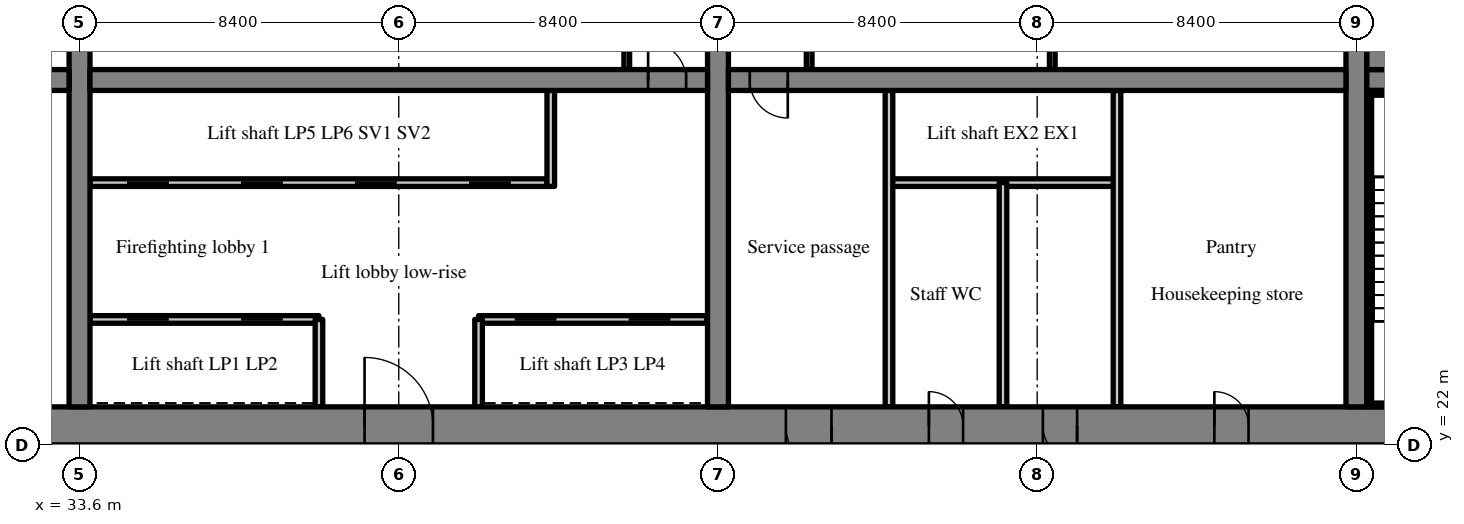
"""IFC4 building model, lengths in metres.
Left out: names, types, materials, properties, quantities, classifications, styles, units other than length and angle.
Written with IfcOpenShell. Run it as: python <this file> out.ifc"""

import sys

from ifc_helpers import new_model, si_unit, direction, frame, frame_2d, origin, place, context, subcontext, project, spatial, rectangle, extrude, source, transform, mapped, element, fill, save


model = new_model("IFC4")
c1 = context("Model", 3, precision=1e-05, world=origin(), true_north=direction((0.0, 1.0)))
c2 = subcontext(c1, "Body", "Model", "MODEL_VIEW")
j1 = project(units=[si_unit("LENGTHUNIT", "METRE"), si_unit("PLANEANGLEUNIT", "RADIAN")], contexts=[c1])
p1 = place(None, origin())
s1 = spatial("IfcSite", under=j1, at=p1, CompositionType="ELEMENT")
p2 = place(p1, origin())
s2 = spatial("IfcBuilding", under=s1, at=p2, CompositionType="ELEMENT")
p3 = place(p2, frame((0.0, 0.0, 54.4)))
s3 = spatial("IfcBuildingStorey", under=s2, at=p3, CompositionType="ELEMENT", Elevation=54.4)
m1 = source(origin(), c2, "Body", "SweptSolid", [
    extrude(rectangle(XDim=50.4, YDim=1.0, at=frame_2d((25.2, 0.0))), origin(), (0.0, 0.0, 1.0), 3.52),
])
p4 = place(p3, frame((25.2, 22.5, 0.0), z_axis=(0.0, 0.0, 1.0), x_axis=(1.0, 0.0, 0.0)))
e1 = element("IfcWall", 1, at=p4, inside=s3, PredefinedType="SHEAR", context=c2, shape_type="MappedRepresentation", body=[
    mapped(m1, transform((0.0, 0.0, 0.0), scale=1.0)),
])
m2 = source(origin(), c2, "Body", "SweptSolid", [
    extrude(rectangle(XDim=1.8, YDim=2.1, at=frame_2d((0.9, 1.05))), frame((0.0, 0.51, 0.0), z_axis=(0.0, -1.0, 0.0), x_axis=(1.0, 0.0, 0.0)), (0.0, 0.0, 1.0), 1.02),
])
p5 = place(p4, frame((15.9, 0.0, 0.0)))
e2 = element("IfcOpeningElement", 2, at=p5, cuts=e1, PredefinedType="OPENING", context=c2, shape_type="MappedRepresentation", body=[
    mapped(m2, transform((0.0, 0.0, 0.0), scale=1.0)),
])
m3 = source(origin(), c2, "Body", "SweptSolid", [
    extrude(rectangle(XDim=1.2, YDim=2.1, at=frame_2d((0.6, 1.05))), frame((0.0, 0.51, 0.0), z_axis=(0.0, -1.0, 0.0), x_axis=(1.0, 0.0, 0.0)), (0.0, 0.0, 1.0), 1.02),
])
p6 = place(p4, frame((26.987, 0.0, 0.0)))
e3 = element("IfcOpeningElement", 3, at=p6, cuts=e1, PredefinedType="OPENING", context=c2, shape_type="MappedRepresentation", body=[
    mapped(m3, transform((0.0, 0.0, 0.0), scale=1.0)),
])
m4 = source(origin(), c2, "Body", "SweptSolid", [
    extrude(rectangle(XDim=0.9, YDim=2.1, at=frame_2d((0.45, 1.05))), frame((0.0, 0.51, 0.0), z_axis=(0.0, -1.0, 0.0), x_axis=(1.0, 0.0, 0.0)), (0.0, 0.0, 1.0), 1.02),
])
p7 = place(p4, frame((33.75, 0.0, 0.0)))
e4 = element("IfcOpeningElement", 4, at=p7, cuts=e1, PredefinedType="OPENING", context=c2, shape_type="MappedRepresentation", body=[
    mapped(m4, transform((0.0, 0.0, 0.0), scale=1.0)),
])
p8 = place(p4, frame((30.75, 0.0, 0.0)))
e5 = element("IfcOpeningElement", 5, at=p8, cuts=e1, PredefinedType="OPENING", context=c2, shape_type="MappedRepresentation", body=[
    mapped(m4, transform((0.0, 0.0, 0.0), scale=1.0)),
])
p9 = place(p4, frame((38.262, 0.0, 0.0)))
e6 = element("IfcOpeningElement", 6, at=p9, cuts=e1, PredefinedType="OPENING", context=c2, shape_type="MappedRepresentation", body=[
    mapped(m4, transform((0.0, 0.0, 0.0), scale=1.0)),
])
p10 = place(p4, frame((6.438, 0.0, 0.0)))
e7 = element("IfcOpeningElement", 7, at=p10, cuts=e1, PredefinedType="OPENING", context=c2, shape_type="MappedRepresentation", body=[
    mapped(m3, transform((0.0, 0.0, 0.0), scale=1.0)),
])
p11 = place(p4, frame((47.725, 0.0, 0.0)))
e8 = element("IfcOpeningElement", 8, at=p11, cuts=e1, PredefinedType="OPENING", context=c2, shape_type="MappedRepresentation", body=[
    mapped(m3, transform((0.0, 0.0, 0.0), scale=1.0)),
])
m5 = source(origin(), c2, "Body", "SweptSolid", [
    extrude(rectangle(XDim=18.0, YDim=0.55, at=frame_2d((9.0, 0.0))), origin(), (0.0, 0.0, 1.0), 3.52),
])
p12 = place(p3, frame((33.6, 23.0, 0.0), z_axis=(0.0, 0.0, 1.0), x_axis=(0.0, 1.0, 0.0)))
e9 = element("IfcWall", 9, at=p12, inside=s3, PredefinedType="SHEAR", context=c2, shape_type="MappedRepresentation", body=[
    mapped(m5, transform((0.0, 0.0, 0.0), scale=1.0)),
])
m6 = source(origin(), c2, "Body", "SweptSolid", [
    extrude(rectangle(XDim=1.1, YDim=2.1, at=frame_2d((0.55, 1.05))), frame((0.0, 0.285, 0.0), z_axis=(0.0, -1.0, 0.0), x_axis=(1.0, 0.0, 0.0)), (0.0, 0.0, 1.0), 0.57),
])
p13 = place(p12, frame((12.45, 0.0, 0.0)))
e10 = element("IfcOpeningElement", 10, at=p13, cuts=e9, PredefinedType="OPENING", context=c2, shape_type="MappedRepresentation", body=[
    mapped(m6, transform((0.0, 0.0, 0.0), scale=1.0)),
])
p14 = place(p3, frame((50.4, 23.0, 0.0), z_axis=(0.0, 0.0, 1.0), x_axis=(0.0, 1.0, 0.0)))
e11 = element("IfcWall", 11, at=p14, inside=s3, PredefinedType="SHEAR", context=c2, shape_type="MappedRepresentation", body=[
    mapped(m5, transform((0.0, 0.0, 0.0), scale=1.0)),
])
p15 = place(p14, frame((12.45, 0.0, 0.0)))
e12 = element("IfcOpeningElement", 12, at=p15, cuts=e11, PredefinedType="OPENING", context=c2, shape_type="MappedRepresentation", body=[
    mapped(m6, transform((0.0, 0.0, 0.0), scale=1.0)),
])
p16 = place(p3, frame((67.2, 23.0, 0.0), z_axis=(0.0, 0.0, 1.0), x_axis=(0.0, 1.0, 0.0)))
e13 = element("IfcWall", 13, at=p16, inside=s3, PredefinedType="SHEAR", context=c2, shape_type="MappedRepresentation", body=[
    mapped(m5, transform((0.0, 0.0, 0.0), scale=1.0)),
])
m7 = source(origin(), c2, "Body", "SweptSolid", [
    extrude(rectangle(XDim=7.125, YDim=0.55, at=frame_2d((3.562, 0.0))), origin(), (0.0, 0.0, 1.0), 3.52),
])
p17 = place(p3, frame((26.2, 31.6, 0.0), z_axis=(0.0, 0.0, 1.0), x_axis=(1.0, 0.0, 0.0)))
e14 = element("IfcWall", 14, at=p17, inside=s3, PredefinedType="SHEAR", context=c2, shape_type="MappedRepresentation", body=[
    mapped(m7, transform((0.0, 0.0, 0.0), scale=1.0)),
])
p18 = place(p17, frame((5.488, 0.0, 0.0)))
e15 = element("IfcOpeningElement", 15, at=p18, cuts=e14, PredefinedType="OPENING", context=c2, shape_type="MappedRepresentation", body=[
    mapped(m6, transform((0.0, 0.0, 0.0), scale=1.0)),
])
m8 = source(origin(), c2, "Body", "SweptSolid", [
    extrude(rectangle(XDim=16.25, YDim=0.55, at=frame_2d((8.125, 0.0))), origin(), (0.0, 0.0, 1.0), 3.52),
])
p19 = place(p3, frame((33.875, 31.6, 0.0), z_axis=(0.0, 0.0, 1.0), x_axis=(1.0, 0.0, 0.0)))
e16 = element("IfcWall", 16, at=p19, inside=s3, PredefinedType="SHEAR", context=c2, shape_type="MappedRepresentation", body=[
    mapped(m8, transform((0.0, 0.0, 0.0), scale=1.0)),
])
m9 = source(origin(), c2, "Body", "SweptSolid", [
    extrude(rectangle(XDim=1.0, YDim=2.1, at=frame_2d((0.5, 1.05))), frame((0.0, 0.285, 0.0), z_axis=(0.0, -1.0, 0.0), x_axis=(1.0, 0.0, 0.0)), (0.0, 0.0, 1.0), 0.57),
])
p20 = place(p19, frame((14.687, 0.0, 0.0)))
e17 = element("IfcOpeningElement", 17, at=p20, cuts=e16, PredefinedType="OPENING", context=c2, shape_type="MappedRepresentation", body=[
    mapped(m9, transform((0.0, 0.0, 0.0), scale=1.0)),
])
p21 = place(p3, frame((50.675, 31.6, 0.0), z_axis=(0.0, 0.0, 1.0), x_axis=(1.0, 0.0, 0.0)))
e18 = element("IfcWall", 18, at=p21, inside=s3, PredefinedType="SHEAR", context=c2, shape_type="MappedRepresentation", body=[
    mapped(m8, transform((0.0, 0.0, 0.0), scale=1.0)),
])
p22 = place(p21, frame((0.562, 0.0, 0.0)))
e19 = element("IfcOpeningElement", 19, at=p22, cuts=e18, PredefinedType="OPENING", context=c2, shape_type="MappedRepresentation", body=[
    mapped(m9, transform((0.0, 0.0, 0.0), scale=1.0)),
])
p23 = place(p3, frame((67.475, 31.6, 0.0), z_axis=(0.0, 0.0, 1.0), x_axis=(1.0, 0.0, 0.0)))
e20 = element("IfcWall", 20, at=p23, inside=s3, PredefinedType="SHEAR", context=c2, shape_type="MappedRepresentation", body=[
    mapped(m7, transform((0.0, 0.0, 0.0), scale=1.0)),
])
p24 = place(p23, frame((5.5, 0.0, 0.0)))
e21 = element("IfcOpeningElement", 21, at=p24, cuts=e20, PredefinedType="OPENING", context=c2, shape_type="MappedRepresentation", body=[
    mapped(m6, transform((0.0, 0.0, 0.0), scale=1.0)),
])
m10 = source(origin(), c2, "Body", "SweptSolid", [
    extrude(rectangle(XDim=6.025, YDim=0.2, at=frame_2d((3.012, 0.0))), origin(), (0.0, 0.0, 1.0), 3.52),
])
p25 = place(p3, frame((33.875, 25.3, 0.0), z_axis=(0.0, 0.0, 1.0), x_axis=(1.0, 0.0, 0.0)))
e22 = element("IfcWall", 22, at=p25, inside=s3, PredefinedType="SOLIDWALL", context=c2, shape_type="MappedRepresentation", body=[
    mapped(m10, transform((0.0, 0.0, 0.0), scale=1.0)),
])
m11 = source(origin(), c2, "Body", "SweptSolid", [
    extrude(rectangle(XDim=1.1, YDim=2.1, at=frame_2d((0.55, 1.05))), frame((0.0, 0.11, 0.0), z_axis=(0.0, -1.0, 0.0), x_axis=(1.0, 0.0, 0.0)), (0.0, 0.0, 1.0), 0.22),
])
p26 = place(p25, frame((0.975, 0.0, 0.0)))
e23 = element("IfcOpeningElement", 23, at=p26, cuts=e22, PredefinedType="OPENING", context=c2, shape_type="MappedRepresentation", body=[
    mapped(m11, transform((0.0, 0.0, 0.0), scale=1.0)),
])
p27 = place(p25, frame((3.975, 0.0, 0.0)))
e24 = element("IfcOpeningElement", 24, at=p27, cuts=e22, PredefinedType="OPENING", context=c2, shape_type="MappedRepresentation", body=[
    mapped(m11, transform((0.0, 0.0, 0.0), scale=1.0)),
])
m12 = source(origin(), c2, "Body", "SweptSolid", [
    extrude(rectangle(XDim=6.0, YDim=0.2, at=frame_2d((3.0, 0.0))), origin(), (0.0, 0.0, 1.0), 3.52),
])
p28 = place(p3, frame((44.1, 25.3, 0.0), z_axis=(0.0, 0.0, 1.0), x_axis=(1.0, 0.0, 0.0)))
e25 = element("IfcWall", 25, at=p28, inside=s3, PredefinedType="SOLIDWALL", context=c2, shape_type="MappedRepresentation", body=[
    mapped(m12, transform((0.0, 0.0, 0.0), scale=1.0)),
])
p29 = place(p28, frame((0.95, 0.0, 0.0)))
e26 = element("IfcOpeningElement", 26, at=p29, cuts=e25, PredefinedType="OPENING", context=c2, shape_type="MappedRepresentation", body=[
    mapped(m11, transform((0.0, 0.0, 0.0), scale=1.0)),
])
p30 = place(p28, frame((3.95, 0.0, 0.0)))
e27 = element("IfcOpeningElement", 27, at=p30, cuts=e25, PredefinedType="OPENING", context=c2, shape_type="MappedRepresentation", body=[
    mapped(m11, transform((0.0, 0.0, 0.0), scale=1.0)),
])
m13 = source(origin(), c2, "Body", "SweptSolid", [
    extrude(rectangle(XDim=12.025, YDim=0.2, at=frame_2d((6.012, 0.0))), origin(), (0.0, 0.0, 1.0), 3.52),
])
p31 = place(p3, frame((33.875, 28.9, 0.0), z_axis=(0.0, 0.0, 1.0), x_axis=(1.0, 0.0, 0.0)))
e28 = element("IfcWall", 28, at=p31, inside=s3, PredefinedType="SOLIDWALL", context=c2, shape_type="MappedRepresentation", body=[
    mapped(m13, transform((0.0, 0.0, 0.0), scale=1.0)),
])
p32 = place(p31, frame((0.975, 0.0, 0.0)))
e29 = element("IfcOpeningElement", 29, at=p32, cuts=e28, PredefinedType="OPENING", context=c2, shape_type="MappedRepresentation", body=[
    mapped(m11, transform((0.0, 0.0, 0.0), scale=1.0)),
])
p33 = place(p31, frame((3.975, 0.0, 0.0)))
e30 = element("IfcOpeningElement", 30, at=p33, cuts=e28, PredefinedType="OPENING", context=c2, shape_type="MappedRepresentation", body=[
    mapped(m11, transform((0.0, 0.0, 0.0), scale=1.0)),
])
p34 = place(p31, frame((6.975, 0.0, 0.0)))
e31 = element("IfcOpeningElement", 31, at=p34, cuts=e28, PredefinedType="OPENING", context=c2, shape_type="MappedRepresentation", body=[
    mapped(m11, transform((0.0, 0.0, 0.0), scale=1.0)),
])
p35 = place(p31, frame((9.975, 0.0, 0.0)))
e32 = element("IfcOpeningElement", 32, at=p35, cuts=e28, PredefinedType="OPENING", context=c2, shape_type="MappedRepresentation", body=[
    mapped(m11, transform((0.0, 0.0, 0.0), scale=1.0)),
])
m14 = source(origin(), c2, "Body", "SweptSolid", [
    extrude(rectangle(XDim=2.3, YDim=0.2, at=frame_2d((1.15, 0.0))), origin(), (0.0, 0.0, 1.0), 3.52),
])
for number, where, z_axis, x_axis in (
    (33, (39.9, 23.0, 0.0), (0.0, 0.0, 1.0), (0.0, 1.0, 0.0)),
    (34, (44.1, 23.0, 0.0), (0.0, 0.0, 1.0), (0.0, 1.0, 0.0)),
):
    element("IfcWall", number, at=place(p3, frame(where, z_axis=z_axis, x_axis=x_axis)), inside=s3, PredefinedType="SOLIDWALL", context=c2, shape_type="MappedRepresentation", body=[
        mapped(m14, transform((0.0, 0.0, 0.0), scale=1.0)),
    ])
m15 = source(origin(), c2, "Body", "SweptSolid", [
    extrude(rectangle(XDim=2.525, YDim=0.2, at=frame_2d((1.262, 0.0))), origin(), (0.0, 0.0, 1.0), 3.52),
])
p36 = place(p3, frame((46.0, 28.8, 0.0), z_axis=(0.0, 0.0, 1.0), x_axis=(0.0, 1.0, 0.0)))
e35 = element("IfcWall", 35, at=p36, inside=s3, PredefinedType="SOLIDWALL", context=c2, shape_type="MappedRepresentation", body=[
    mapped(m15, transform((0.0, 0.0, 0.0), scale=1.0)),
])
m16 = source(origin(), c2, "Body", "SweptSolid", [
    extrude(rectangle(XDim=3.125, YDim=0.15, at=frame_2d((1.562, 0.0))), origin(), (0.0, 0.0, 1.0), 3.52),
])
p37 = place(p3, frame((48.0, 31.875, 0.0), z_axis=(0.0, 0.0, 1.0), x_axis=(0.0, 1.0, 0.0)))
e36 = element("IfcWall", 36, at=p37, inside=s3, PredefinedType="PARTITIONING", context=c2, shape_type="MappedRepresentation", body=[
    mapped(m16, transform((0.0, 0.0, 0.0), scale=1.0)),
])
p38 = place(p3, frame((60.9, 28.9, 0.0), z_axis=(0.0, 0.0, 1.0), x_axis=(-1.0, 0.0, 0.0)))
e37 = element("IfcWall", 37, at=p38, inside=s3, PredefinedType="SOLIDWALL", context=c2, shape_type="MappedRepresentation", body=[
    mapped(m12, transform((0.0, 0.0, 0.0), scale=1.0)),
])
m17 = source(origin(), c2, "Body", "SweptSolid", [
    extrude(rectangle(XDim=8.325, YDim=0.2, at=frame_2d((4.163, 0.0))), origin(), (0.0, 0.0, 1.0), 3.52),
])
for number, where, z_axis, x_axis in (
    (38, (54.9, 23.0, 0.0), (0.0, 0.0, 1.0), (0.0, 1.0, 0.0)),
    (39, (60.9, 23.0, 0.0), (0.0, 0.0, 1.0), (0.0, 1.0, 0.0)),
):
    element("IfcWall", number, at=place(p3, frame(where, z_axis=z_axis, x_axis=x_axis)), inside=s3, PredefinedType="PARTITIONING", context=c2, shape_type="MappedRepresentation", body=[
        mapped(m17, transform((0.0, 0.0, 0.0), scale=1.0)),
    ])
m18 = source(origin(), c2, "Body", "SweptSolid", [
    extrude(rectangle(XDim=5.9, YDim=0.2, at=frame_2d((2.95, 0.0))), origin(), (0.0, 0.0, 1.0), 3.52),
])
p39 = place(p3, frame((57.9, 23.0, 0.0), z_axis=(0.0, 0.0, 1.0), x_axis=(0.0, 1.0, 0.0)))
e40 = element("IfcWall", 40, at=p39, inside=s3, PredefinedType="PARTITIONING", context=c2, shape_type="MappedRepresentation", body=[
    mapped(m18, transform((0.0, 0.0, 0.0), scale=1.0)),
])
for number, where, z_axis, x_axis in (
    (41, (52.8, 31.875, 0.0), (0.0, 0.0, 1.0), (0.0, 1.0, 0.0)),
    (42, (59.197, 31.875, 0.0), (0.0, 0.0, 1.0), (0.0, 1.0, 0.0)),
):
    element("IfcWall", number, at=place(p3, frame(where, z_axis=z_axis, x_axis=x_axis)), inside=s3, PredefinedType="PARTITIONING", context=c2, shape_type="MappedRepresentation", body=[
        mapped(m16, transform((0.0, 0.0, 0.0), scale=1.0)),
    ])
m19 = source(origin(), c2, "Body", "SweptSolid", [
    extrude(rectangle(XDim=4.775, YDim=0.1, at=frame_2d((2.387, 0.0))), origin(), (0.0, 0.0, 1.0), 3.52),
])
p40 = place(p3, frame((67.475, 23.05, 0.0), z_axis=(0.0, 0.0, 1.0), x_axis=(1.0, 0.0, 0.0)))
e43 = element("IfcWall", 43, at=p40, inside=s3, PredefinedType="SOLIDWALL", context=c2, shape_type="MappedRepresentation", body=[
    mapped(m19, transform((0.0, 0.0, 0.0), scale=1.0)),
])
m20 = source(origin(), c2, "Body", "SweptSolid", [
    extrude(rectangle(XDim=4.775, YDim=0.125, at=frame_2d((2.387, 0.0))), origin(), (0.0, 0.0, 1.0), 3.52),
])
p41 = place(p3, frame((67.475, 31.262, 0.0), z_axis=(0.0, 0.0, 1.0), x_axis=(1.0, 0.0, 0.0)))
e44 = element("IfcWall", 44, at=p41, inside=s3, PredefinedType="SOLIDWALL", context=c2, shape_type="MappedRepresentation", body=[
    mapped(m20, transform((0.0, 0.0, 0.0), scale=1.0)),
])
m21 = source(origin(), c2, "Body", "SweptSolid", [
    extrude(rectangle(XDim=8.1, YDim=0.125, at=frame_2d((4.05, 0.0))), origin(), (0.0, 0.0, 1.0), 3.52),
])
p42 = place(p3, frame((67.537, 23.1, 0.0), z_axis=(0.0, 0.0, 1.0), x_axis=(0.0, 1.0, 0.0)))
e45 = element("IfcWall", 45, at=p42, inside=s3, PredefinedType="SOLIDWALL", context=c2, shape_type="MappedRepresentation", body=[
    mapped(m21, transform((0.0, 0.0, 0.0), scale=1.0)),
])
m22 = source(origin(), c2, "Body", "SweptSolid", [
    extrude(rectangle(XDim=4.775, YDim=0.925, at=frame_2d((2.387, 0.0))), origin(), (0.0, 0.0, 1.0), 3.52),
])
p43 = place(p3, frame((67.475, 32.337, 0.0), z_axis=(0.0, 0.0, 1.0), x_axis=(1.0, 0.0, 0.0)))
e46 = element("IfcWall", 46, at=p43, inside=s3, PredefinedType="SOLIDWALL", context=c2, shape_type="MappedRepresentation", body=[
    mapped(m22, transform((0.0, 0.0, 0.0), scale=1.0)),
])
m23 = source(origin(), c2, "Body", "SweptSolid", [
    extrude(rectangle(XDim=1.8, YDim=2.1, at=frame_2d((0.9, 1.05))), frame((0.0, 0.375, 0.0), z_axis=(0.0, -1.0, 0.0), x_axis=(1.0, 0.0, 0.0)), (0.0, 0.0, 1.0), 0.05),
])
p44 = place(p5, origin())
e47 = element("IfcDoor", 47, at=p44, inside=s3, OperationType="DOUBLE_DOOR_SINGLE_SWING", PredefinedType="DOOR", context=c2, shape_type="MappedRepresentation", body=[
    mapped(m23, transform((0.0, 0.0, 0.0), scale=1.0)),
])
fill(e2, e47)
m24 = source(origin(), c2, "Body", "SweptSolid", [
    extrude(rectangle(XDim=1.0, YDim=2.1, at=frame_2d((0.5, 1.05))), frame((0.0, 0.025, 0.0), z_axis=(0.0, -1.0, 0.0), x_axis=(1.0, 0.0, 0.0)), (0.0, 0.0, 1.0), 0.05),
])
p45 = place(p20, origin())
e48 = element("IfcDoor", 48, at=p45, inside=s3, OperationType="SINGLE_SWING_LEFT", PredefinedType="DOOR", context=c2, shape_type="MappedRepresentation", body=[
    mapped(m24, transform((0.0, 0.0, 0.0), scale=1.0)),
])
fill(e17, e48)
m25 = source(origin(), c2, "Body", "SweptSolid", [
    extrude(rectangle(XDim=1.1, YDim=2.1, at=frame_2d((0.55, 1.05))), frame((0.0, 0.025, 0.0), z_axis=(0.0, -1.0, 0.0), x_axis=(1.0, 0.0, 0.0)), (0.0, 0.0, 1.0), 0.05),
])
p46 = place(p26, origin())
e49 = element("IfcDoor", 49, at=p46, inside=s3, OperationType="SLIDING_TO_LEFT", PredefinedType="DOOR", context=c2, shape_type="MappedRepresentation", body=[
    mapped(m25, transform((0.0, 0.0, 0.0), scale=1.0)),
])
fill(e23, e49)
p47 = place(p27, origin())
e50 = element("IfcDoor", 50, at=p47, inside=s3, OperationType="SLIDING_TO_RIGHT", PredefinedType="DOOR", context=c2, shape_type="MappedRepresentation", body=[
    mapped(m25, transform((0.0, 0.0, 0.0), scale=1.0)),
])
fill(e24, e50)
p48 = place(p29, origin())
e51 = element("IfcDoor", 51, at=p48, inside=s3, OperationType="SLIDING_TO_LEFT", PredefinedType="DOOR", context=c2, shape_type="MappedRepresentation", body=[
    mapped(m25, transform((0.0, 0.0, 0.0), scale=1.0)),
])
fill(e26, e51)
p49 = place(p30, origin())
e52 = element("IfcDoor", 52, at=p49, inside=s3, OperationType="SLIDING_TO_RIGHT", PredefinedType="DOOR", context=c2, shape_type="MappedRepresentation", body=[
    mapped(m25, transform((0.0, 0.0, 0.0), scale=1.0)),
])
fill(e27, e52)
p50 = place(p32, origin())
e53 = element("IfcDoor", 53, at=p50, inside=s3, OperationType="SLIDING_TO_LEFT", PredefinedType="DOOR", context=c2, shape_type="MappedRepresentation", body=[
    mapped(m25, transform((0.0, 0.0, 0.0), scale=1.0)),
])
fill(e29, e53)
p51 = place(p33, origin())
e54 = element("IfcDoor", 54, at=p51, inside=s3, OperationType="SLIDING_TO_RIGHT", PredefinedType="DOOR", context=c2, shape_type="MappedRepresentation", body=[
    mapped(m25, transform((0.0, 0.0, 0.0), scale=1.0)),
])
fill(e30, e54)
p52 = place(p34, origin())
e55 = element("IfcDoor", 55, at=p52, inside=s3, OperationType="SLIDING_TO_LEFT", PredefinedType="DOOR", context=c2, shape_type="MappedRepresentation", body=[
    mapped(m25, transform((0.0, 0.0, 0.0), scale=1.0)),
])
fill(e31, e55)
p53 = place(p35, origin())
e56 = element("IfcDoor", 56, at=p53, inside=s3, OperationType="SLIDING_TO_RIGHT", PredefinedType="DOOR", context=c2, shape_type="MappedRepresentation", body=[
    mapped(m25, transform((0.0, 0.0, 0.0), scale=1.0)),
])
fill(e32, e56)
m26 = source(origin(), c2, "Body", "SweptSolid", [
    extrude(rectangle(XDim=1.2, YDim=2.1, at=frame_2d((0.6, 1.05))), frame((0.0, 0.375, 0.0), z_axis=(0.0, -1.0, 0.0), x_axis=(1.0, 0.0, 0.0)), (0.0, 0.0, 1.0), 0.05),
])
p54 = place(p6, origin())
e57 = element("IfcDoor", 57, at=p54, inside=s3, OperationType="SINGLE_SWING_RIGHT", PredefinedType="DOOR", context=c2, shape_type="MappedRepresentation", body=[
    mapped(m26, transform((0.0, 0.0, 0.0), scale=1.0)),
])
fill(e3, e57)
p55 = place(p22, origin())
e58 = element("IfcDoor", 58, at=p55, inside=s3, OperationType="SINGLE_SWING_RIGHT", PredefinedType="DOOR", context=c2, shape_type="MappedRepresentation", body=[
    mapped(m24, transform((0.0, 0.0, 0.0), scale=1.0)),
])
fill(e19, e58)
m27 = source(origin(), c2, "Body", "SweptSolid", [
    extrude(rectangle(XDim=0.9, YDim=2.1, at=frame_2d((0.45, 1.05))), frame((0.0, 0.375, 0.0), z_axis=(0.0, -1.0, 0.0), x_axis=(1.0, 0.0, 0.0)), (0.0, 0.0, 1.0), 0.05),
])
p56 = place(p7, origin())
e59 = element("IfcDoor", 59, at=p56, inside=s3, OperationType="SINGLE_SWING_RIGHT", PredefinedType="DOOR", context=c2, shape_type="MappedRepresentation", body=[
    mapped(m27, transform((0.0, 0.0, 0.0), scale=1.0)),
])
fill(e4, e59)
p57 = place(p8, origin())
e60 = element("IfcDoor", 60, at=p57, inside=s3, OperationType="SINGLE_SWING_LEFT", PredefinedType="DOOR", context=c2, shape_type="MappedRepresentation", body=[
    mapped(m27, transform((0.0, 0.0, 0.0), scale=1.0)),
])
fill(e5, e60)
p58 = place(p9, origin())
e61 = element("IfcDoor", 61, at=p58, inside=s3, OperationType="SINGLE_SWING_LEFT", PredefinedType="DOOR", context=c2, shape_type="MappedRepresentation", body=[
    mapped(m27, transform((0.0, 0.0, 0.0), scale=1.0)),
])
fill(e6, e61)
save(model, sys.argv[1])
